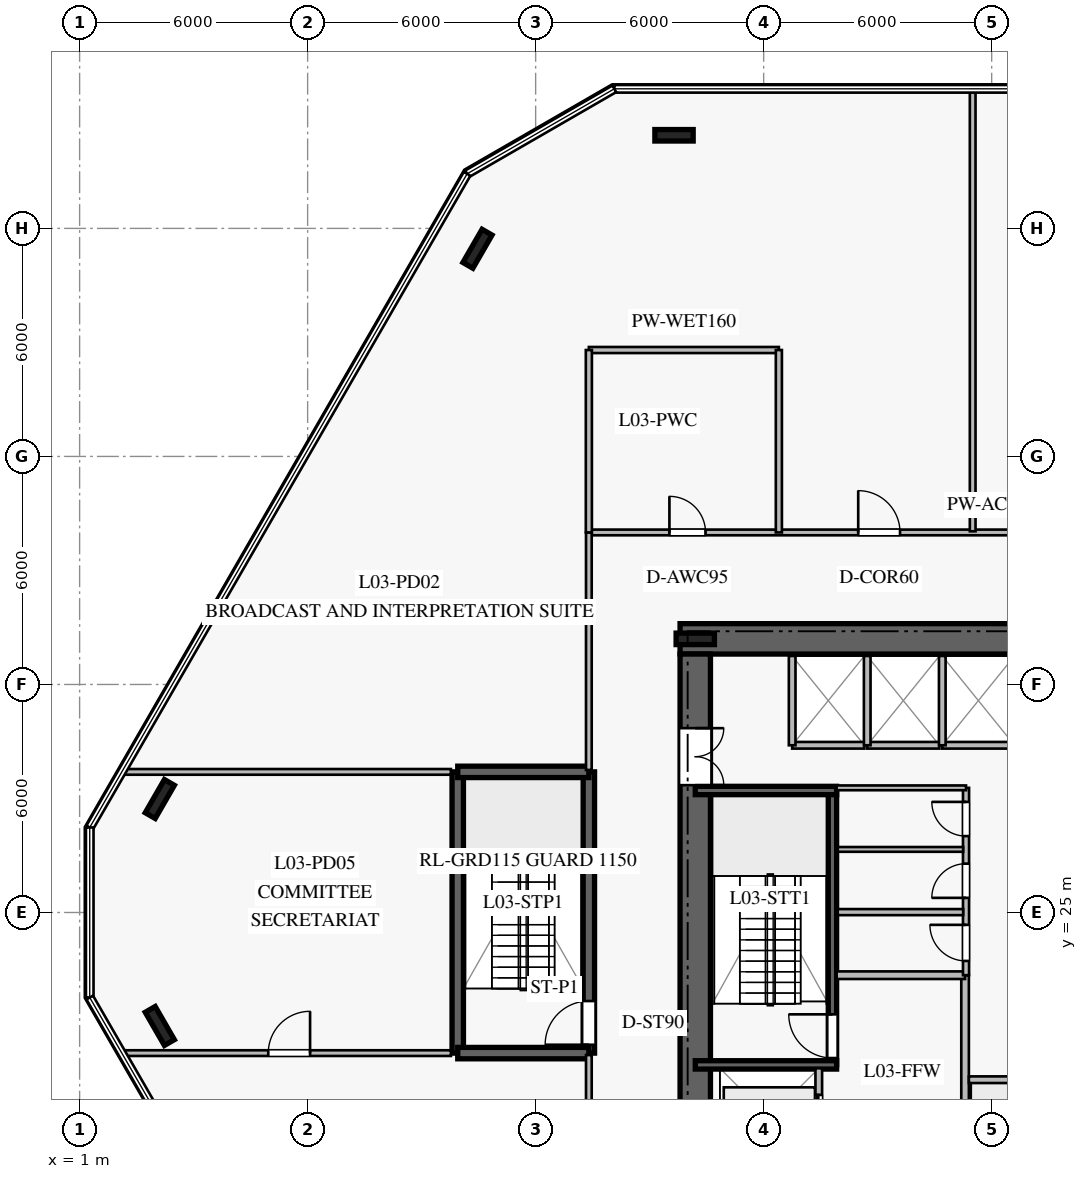
"""IFC4 building model, lengths in metres.
Left out: names, types, materials, properties, quantities, classifications, styles, units other than length and angle.
Written with IfcOpenShell. Run it as: python <this file> out.ifc"""

import sys

from ifc_helpers import new_model, si_unit, direction, frame, frame_2d, origin, origin_2d, place, context, subcontext, project, spatial, rectangle, i_section, extrude, element, fill, save


model = new_model("IFC4")
c1 = context("Model", 3, precision=1e-05, world=origin(), true_north=direction((0.0, 1.0)))
c2 = subcontext(c1, "Body", "Model", "MODEL_VIEW")
j1 = project(units=[si_unit("LENGTHUNIT", "METRE"), si_unit("PLANEANGLEUNIT", "RADIAN")], contexts=[c1])
p1 = place(None, origin())
s1 = spatial("IfcSite", under=j1, at=p1, CompositionType="ELEMENT")
p2 = place(p1, origin())
s2 = spatial("IfcBuilding", under=s1, at=p2, CompositionType="ELEMENT")
p3 = place(p2, frame((0.0, 0.0, 14.4)))
s3 = spatial("IfcBuildingStorey", under=s2, at=p3, CompositionType="ELEMENT", Elevation=14.4)
p4 = place(p3, frame((33.2, 32.2, 0.0), z_axis=(0.0, 0.0, 1.0), x_axis=(-1.0, 0.0, 0.0)))
e1 = element("IfcWall", 1, at=p4, inside=s3, PredefinedType="SHEAR", context=c2, shape_type="SweptSolid", body=[
    extrude(rectangle(XDim=16.4, YDim=0.8, at=frame_2d((8.2, 0.0))), origin(), (0.0, 0.0, 1.0), 4.3),
])
p5 = place(p4, frame((5.15, 0.0, 0.0)))
e2 = element("IfcOpeningElement", 2, at=p5, cuts=e1, PredefinedType="OPENING", context=c2, shape_type="SweptSolid", body=[
    extrude(rectangle(XDim=1.2, YDim=2.25, at=frame_2d((0.6, 1.125))), frame((0.0, 0.41, 0.0), z_axis=(0.0, -1.0, 0.0), x_axis=(1.0, 0.0, 0.0)), (0.0, 0.0, 1.0), 0.82),
])
p6 = place(p3, frame((17.2, 31.8, 0.0), z_axis=(0.0, 0.0, 1.0), x_axis=(0.0, -1.0, 0.0)))
e3 = element("IfcWall", 3, at=p6, inside=s3, PredefinedType="SHEAR", context=c2, shape_type="SweptSolid", body=[
    extrude(rectangle(XDim=13.6, YDim=0.8, at=frame_2d((6.8, 0.0))), origin(), (0.0, 0.0, 1.0), 4.3),
])
p7 = place(p6, frame((1.95, 0.0, 0.0)))
e4 = element("IfcOpeningElement", 4, at=p7, cuts=e3, PredefinedType="OPENING", context=c2, shape_type="SweptSolid", body=[
    extrude(rectangle(XDim=1.5, YDim=2.2, at=frame_2d((0.75, 1.1))), frame((0.0, 0.41, 0.0), z_axis=(0.0, -1.0, 0.0), x_axis=(1.0, 0.0, 0.0)), (0.0, 0.0, 1.0), 0.82),
])
p8 = place(p3, frame((17.2, 32.2, 0.0), z_axis=(0.0, 0.0, 1.0), x_axis=(1.0, 0.0, 0.0)))
e5 = element("IfcColumn", 5, at=p8, inside=s3, PredefinedType="COLUMN", context=c2, shape_type="SweptSolid", body=[
    extrude(i_section(OverallWidth=0.302, OverallDepth=1.008, WebThickness=0.021, FlangeThickness=0.04, at=origin_2d()), origin(), (0.0, 0.0, 1.0), 4.6),
])
p9 = place(p3, frame((20.81, 20.99, 0.0), z_axis=(0.0, 0.0, 1.0), x_axis=(0.0, 1.0, 0.0)))
e6 = element("IfcWall", 6, at=p9, inside=s3, PredefinedType="SOLIDWALL", context=c2, shape_type="SweptSolid", body=[
    extrude(rectangle(XDim=7.22, YDim=0.22, at=frame_2d((3.61, 0.0))), origin(), (0.0, 0.0, 1.0), 4.3),
])
p10 = place(p9, frame((0.18, 0.0, 0.0)))
e7 = element("IfcOpeningElement", 7, at=p10, cuts=e6, PredefinedType="OPENING", context=c2, shape_type="SweptSolid", body=[
    extrude(rectangle(XDim=1.15, YDim=2.2, at=frame_2d((0.575, 1.1))), frame((0.0, 0.12, 0.0), z_axis=(0.0, -1.0, 0.0), x_axis=(1.0, 0.0, 0.0)), (0.0, 0.0, 1.0), 0.24),
])
for number, where, z_axis, x_axis in (
    (8, (17.2, 20.99, 0.0), (0.0, 0.0, 1.0), (1.0, 0.0, 0.0)),
    (9, (17.2, 28.21, 0.0), (0.0, 0.0, 1.0), (1.0, 0.0, 0.0)),
):
    element("IfcWall", number, at=place(p3, frame(where, z_axis=z_axis, x_axis=x_axis)), inside=s3, PredefinedType="SOLIDWALL", context=c2, shape_type="SweptSolid", body=[
        extrude(rectangle(XDim=3.72, YDim=0.22, at=frame_2d((1.86, 0.0))), origin(), (0.0, 0.0, 1.0), 4.3),
    ])
p11 = place(p3, frame((14.4, 21.3, 0.0), z_axis=(0.0, 0.0, 1.0), x_axis=(0.0, 1.0, 0.0)))
e10 = element("IfcWall", 10, at=p11, inside=s3, PredefinedType="SOLIDWALL", context=c2, shape_type="SweptSolid", body=[
    extrude(rectangle(XDim=7.4, YDim=0.3, at=frame_2d((3.7, 0.0))), origin(), (0.0, 0.0, 1.0), 4.3),
])
p12 = place(p11, frame((0.22, 0.0, 0.0)))
e11 = element("IfcOpeningElement", 11, at=p12, cuts=e10, PredefinedType="OPENING", context=c2, shape_type="SweptSolid", body=[
    extrude(rectangle(XDim=1.15, YDim=2.2, at=frame_2d((0.575, 1.1))), frame((0.0, 0.16, 0.0), z_axis=(0.0, -1.0, 0.0), x_axis=(1.0, 0.0, 0.0)), (0.0, 0.0, 1.0), 0.32),
])
p13 = place(p3, frame((10.95, 21.3, 0.0), z_axis=(0.0, 0.0, 1.0), x_axis=(0.0, 1.0, 0.0)))
e12 = element("IfcWall", 12, at=p13, inside=s3, PredefinedType="SOLIDWALL", context=c2, shape_type="SweptSolid", body=[
    extrude(rectangle(XDim=7.4, YDim=0.3, at=frame_2d((3.7, 0.0))), origin(), (0.0, 0.0, 1.0), 4.3),
])
for number, where, z_axis, x_axis in (
    (13, (10.95, 21.3, 0.0), (0.0, 0.0, 1.0), (1.0, 0.0, 0.0)),
    (14, (10.95, 28.7, 0.0), (0.0, 0.0, 1.0), (1.0, 0.0, 0.0)),
):
    element("IfcWall", number, at=place(p3, frame(where, z_axis=z_axis, x_axis=x_axis)), inside=s3, PredefinedType="SOLIDWALL", context=c2, shape_type="SweptSolid", body=[
        extrude(rectangle(XDim=3.45, YDim=0.3, at=frame_2d((1.725, 0.0))), origin(), (0.0, 0.0, 1.0), 4.3),
    ])
for number, where, z_axis, x_axis in (
    (15, (16.641, 45.45, 0.0), (0.0, 0.0, 1.0), (1.0, 0.0, 0.0)),
    (16, (11.469, 42.464, 0.0), (0.0, 0.0, 1.0), (0.5, 0.866, 0.0)),
    (17, (3.11, 27.986, 0.0), (0.0, 0.0, 1.0), (0.5, 0.866, 0.0)),
    (18, (3.11, 22.014, 0.0), (0.0, 0.0, 1.0), (-0.5, 0.866, 0.0)),
):
    element("IfcColumn", number, at=place(p3, frame(where, z_axis=z_axis, x_axis=x_axis)), inside=s3, PredefinedType="COLUMN", context=c2, shape_type="SweptSolid", body=[
        extrude(i_section(OverallWidth=0.302, OverallDepth=1.008, WebThickness=0.021, FlangeThickness=0.04, at=origin_2d()), origin(), (0.0, 0.0, 1.0), 4.6),
    ])
p14 = place(p3, frame((24.3, 18.2, 0.0), z_axis=(0.0, 0.0, 1.0), x_axis=(0.0, 1.0, 0.0)))
e19 = element("IfcWall", 19, at=p14, inside=s3, PredefinedType="PARTITIONING", context=c2, shape_type="SweptSolid", body=[
    extrude(rectangle(XDim=5.15, YDim=0.2, at=frame_2d((2.575, 0.0))), origin(), (0.0, 0.0, 1.0), 4.3),
])
p15 = place(p3, frame((20.92, 23.35, 0.0), z_axis=(0.0, 0.0, 1.0), x_axis=(1.0, 0.0, 0.0)))
e20 = element("IfcWall", 20, at=p15, inside=s3, PredefinedType="PARTITIONING", context=c2, shape_type="SweptSolid", body=[
    extrude(rectangle(XDim=3.38, YDim=0.2, at=frame_2d((1.69, 0.0))), origin(), (0.0, 0.0, 1.0), 4.3),
])
p16 = place(p3, frame((24.325, 23.35, 0.0), z_axis=(0.0, 0.0, 1.0), x_axis=(0.0, 1.0, 0.0)))
e21 = element("IfcWall", 21, at=p16, inside=s3, PredefinedType="PLUMBINGWALL", context=c2, shape_type="SweptSolid", body=[
    extrude(rectangle(XDim=4.93, YDim=0.16, at=frame_2d((2.465, 0.0))), origin(), (0.0, 0.0, 1.0), 4.3),
])
p17 = place(p16, frame((0.375, 0.0, 0.0)))
e22 = element("IfcOpeningElement", 22, at=p17, cuts=e21, PredefinedType="OPENING", context=c2, shape_type="SweptSolid", body=[
    extrude(rectangle(XDim=0.95, YDim=2.1, at=frame_2d((0.475, 1.05))), frame((0.0, 0.09, 0.0), z_axis=(0.0, -1.0, 0.0), x_axis=(1.0, 0.0, 0.0)), (0.0, 0.0, 1.0), 0.18),
])
p18 = place(p16, frame((2.035, 0.0, 0.0)))
e23 = element("IfcOpeningElement", 23, at=p18, cuts=e21, PredefinedType="OPENING", context=c2, shape_type="SweptSolid", body=[
    extrude(rectangle(XDim=0.9, YDim=2.1, at=frame_2d((0.45, 1.05))), frame((0.0, 0.09, 0.0), z_axis=(0.0, -1.0, 0.0), x_axis=(1.0, 0.0, 0.0)), (0.0, 0.0, 1.0), 0.18),
])
p19 = place(p16, frame((3.66, 0.0, 0.0)))
e24 = element("IfcOpeningElement", 24, at=p19, cuts=e21, PredefinedType="OPENING", context=c2, shape_type="SweptSolid", body=[
    extrude(rectangle(XDim=0.9, YDim=2.1, at=frame_2d((0.45, 1.05))), frame((0.0, 0.09, 0.0), z_axis=(0.0, -1.0, 0.0), x_axis=(1.0, 0.0, 0.0)), (0.0, 0.0, 1.0), 0.18),
])
p20 = place(p3, frame((20.92, 28.28, 0.0), z_axis=(0.0, 0.0, 1.0), x_axis=(1.0, 0.0, 0.0)))
e25 = element("IfcWall", 25, at=p20, inside=s3, PredefinedType="PARTITIONING", context=c2, shape_type="SweptSolid", body=[
    extrude(rectangle(XDim=3.405, YDim=0.125, at=frame_2d((1.703, 0.0))), origin(), (0.0, 0.0, 1.0), 4.3),
])
p21 = place(p3, frame((20.95, 25.01, 0.0), z_axis=(0.0, 0.0, 1.0), x_axis=(1.0, 0.0, 0.0)))
e26 = element("IfcWall", 26, at=p21, inside=s3, PredefinedType="PLUMBINGWALL", context=c2, shape_type="SweptSolid", body=[
    extrude(rectangle(XDim=3.3, YDim=0.16, at=frame_2d((1.65, 0.0))), origin(), (0.0, 0.0, 1.0), 4.3),
])
p22 = place(p3, frame((20.95, 26.66, 0.0), z_axis=(0.0, 0.0, 1.0), x_axis=(1.0, 0.0, 0.0)))
e27 = element("IfcWall", 27, at=p22, inside=s3, PredefinedType="PARTITIONING", context=c2, shape_type="SweptSolid", body=[
    extrude(rectangle(XDim=3.3, YDim=0.125, at=frame_2d((1.65, 0.0))), origin(), (0.0, 0.0, 1.0), 4.3),
])
p23 = place(p3, frame((24.4, 20.6, 0.0), z_axis=(0.0, 0.0, 1.0), x_axis=(1.0, 0.0, 0.0)))
e28 = element("IfcWall", 28, at=p23, inside=s3, PredefinedType="PARTITIONING", context=c2, shape_type="SweptSolid", body=[
    extrude(rectangle(XDim=1.9, YDim=0.175, at=frame_2d((0.95, 0.0))), origin(), (0.0, 0.0, 1.0), 4.3),
])
p24 = place(p3, frame((19.75, 29.4, 0.0), z_axis=(0.0, 0.0, 1.0), x_axis=(1.0, 0.0, 0.0)))
e29 = element("IfcWall", 29, at=p24, inside=s3, PredefinedType="PARTITIONING", context=c2, shape_type="SweptSolid", body=[
    extrude(rectangle(XDim=1.9, YDim=0.175, at=frame_2d((0.95, 0.0))), origin(), (0.0, 0.0, 1.0), 4.3),
])
p25 = place(p3, frame((19.75, 29.4, 0.0), z_axis=(0.0, 0.0, 1.0), x_axis=(0.0, 1.0, 0.0)))
e30 = element("IfcWall", 30, at=p25, inside=s3, PredefinedType="PARTITIONING", context=c2, shape_type="SweptSolid", body=[
    extrude(rectangle(XDim=2.35, YDim=0.175, at=frame_2d((1.175, 0.0))), origin(), (0.0, 0.0, 1.0), 4.3),
])
p26 = place(p3, frame((21.725, 29.4, 0.0), z_axis=(0.0, 0.0, 1.0), x_axis=(1.0, 0.0, 0.0)))
e31 = element("IfcWall", 31, at=p26, inside=s3, PredefinedType="PARTITIONING", context=c2, shape_type="SweptSolid", body=[
    extrude(rectangle(XDim=1.9, YDim=0.175, at=frame_2d((0.95, 0.0))), origin(), (0.0, 0.0, 1.0), 4.3),
])
p27 = place(p3, frame((21.725, 29.4, 0.0), z_axis=(0.0, 0.0, 1.0), x_axis=(0.0, 1.0, 0.0)))
e32 = element("IfcWall", 32, at=p27, inside=s3, PredefinedType="PARTITIONING", context=c2, shape_type="SweptSolid", body=[
    extrude(rectangle(XDim=2.35, YDim=0.175, at=frame_2d((1.175, 0.0))), origin(), (0.0, 0.0, 1.0), 4.3),
])
p28 = place(p3, frame((23.7, 29.4, 0.0), z_axis=(0.0, 0.0, 1.0), x_axis=(1.0, 0.0, 0.0)))
e33 = element("IfcWall", 33, at=p28, inside=s3, PredefinedType="PARTITIONING", context=c2, shape_type="SweptSolid", body=[
    extrude(rectangle(XDim=1.9, YDim=0.175, at=frame_2d((0.95, 0.0))), origin(), (0.0, 0.0, 1.0), 4.3),
])
p29 = place(p3, frame((23.7, 29.4, 0.0), z_axis=(0.0, 0.0, 1.0), x_axis=(0.0, 1.0, 0.0)))
e34 = element("IfcWall", 34, at=p29, inside=s3, PredefinedType="PARTITIONING", context=c2, shape_type="SweptSolid", body=[
    extrude(rectangle(XDim=2.35, YDim=0.175, at=frame_2d((1.175, 0.0))), origin(), (0.0, 0.0, 1.0), 4.3),
])
p30 = place(p3, frame((20.45, 18.3, 0.0), z_axis=(0.0, 0.0, 1.0), x_axis=(0.0, 1.0, 0.0)))
e35 = element("IfcWall", 35, at=p30, inside=s3, PredefinedType="PARTITIONING", context=c2, shape_type="SweptSolid", body=[
    extrude(rectangle(XDim=2.6, YDim=0.175, at=frame_2d((1.3, 0.0))), origin(), (0.0, 0.0, 1.0), 4.3),
])
p31 = place(p30, frame((0.7, 0.0, 0.0)))
e36 = element("IfcOpeningElement", 36, at=p31, cuts=e35, PredefinedType="OPENING", context=c2, shape_type="SweptSolid", body=[
    extrude(rectangle(XDim=1.2, YDim=2.2, at=frame_2d((0.6, 1.1))), frame((0.0, 0.098, 0.0), z_axis=(0.0, -1.0, 0.0), x_axis=(1.0, 0.0, 0.0)), (0.0, 0.0, 1.0), 0.195),
])
p32 = place(p3, frame((14.4, 35.0, 0.0), z_axis=(0.0, 0.0, 1.0), x_axis=(1.0, 0.0, 0.0)))
e37 = element("IfcWall", 37, at=p32, inside=s3, PredefinedType="PARTITIONING", context=c2, shape_type="SweptSolid", body=[
    extrude(rectangle(XDim=21.2, YDim=0.15, at=frame_2d((10.6, 0.0))), origin(), (0.0, 0.0, 1.0), 3.75),
])
p33 = place(p32, frame((2.12, 0.0, 0.0)))
e38 = element("IfcOpeningElement", 38, at=p33, cuts=e37, PredefinedType="OPENING", context=c2, shape_type="SweptSolid", body=[
    extrude(rectangle(XDim=0.95, YDim=2.1, at=frame_2d((0.475, 1.05))), frame((0.0, 0.085, 0.0), z_axis=(0.0, -1.0, 0.0), x_axis=(1.0, 0.0, 0.0)), (0.0, 0.0, 1.0), 0.17),
])
p34 = place(p32, frame((7.088, 0.0, 0.0)))
e39 = element("IfcOpeningElement", 39, at=p34, cuts=e37, PredefinedType="OPENING", context=c2, shape_type="SweptSolid", body=[
    extrude(rectangle(XDim=1.1, YDim=2.2, at=frame_2d((0.55, 1.1))), frame((0.0, 0.085, 0.0), z_axis=(0.0, -1.0, 0.0), x_axis=(1.0, 0.0, 0.0)), (0.0, 0.0, 1.0), 0.17),
])
p35 = place(p32, frame((18.004, 0.0, 0.0)))
e40 = element("IfcOpeningElement", 40, at=p35, cuts=e37, PredefinedType="OPENING", context=c2, shape_type="SweptSolid", body=[
    extrude(rectangle(XDim=1.1, YDim=2.2, at=frame_2d((0.55, 1.1))), frame((0.0, 0.085, 0.0), z_axis=(0.0, -1.0, 0.0), x_axis=(1.0, 0.0, 0.0)), (0.0, 0.0, 1.0), 0.17),
])
p36 = place(p32, frame((12.55, 0.0, 0.0)))
e41 = element("IfcOpeningElement", 41, at=p36, cuts=e37, PredefinedType="OPENING", context=c2, shape_type="SweptSolid", body=[
    extrude(rectangle(XDim=1.1, YDim=2.2, at=frame_2d((0.55, 1.1))), frame((0.0, 0.085, 0.0), z_axis=(0.0, -1.0, 0.0), x_axis=(1.0, 0.0, 0.0)), (0.0, 0.0, 1.0), 0.17),
])
p37 = place(p3, frame((14.4, 15.0, 0.0), z_axis=(0.0, 0.0, 1.0), x_axis=(0.0, 1.0, 0.0)))
e42 = element("IfcWall", 42, at=p37, inside=s3, PredefinedType="PARTITIONING", context=c2, shape_type="SweptSolid", body=[
    extrude(rectangle(XDim=6.25, YDim=0.15, at=frame_2d((3.125, 0.0))), origin(), (0.0, 0.0, 1.0), 3.75),
])
p38 = place(p3, frame((14.4, 28.75, 0.0), z_axis=(0.0, 0.0, 1.0), x_axis=(0.0, 1.0, 0.0)))
e43 = element("IfcWall", 43, at=p38, inside=s3, PredefinedType="PARTITIONING", context=c2, shape_type="SweptSolid", body=[
    extrude(rectangle(XDim=6.25, YDim=0.15, at=frame_2d((3.125, 0.0))), origin(), (0.0, 0.0, 1.0), 4.3),
])
p39 = place(p3, frame((14.4, 39.8, 0.0), z_axis=(0.0, 0.0, 1.0), x_axis=(1.0, 0.0, 0.0)))
e44 = element("IfcWall", 44, at=p39, inside=s3, PredefinedType="PLUMBINGWALL", context=c2, shape_type="SweptSolid", body=[
    extrude(rectangle(XDim=5.0, YDim=0.16, at=frame_2d((2.5, 0.0))), origin(), (0.0, 0.0, 1.0), 3.75),
])
p40 = place(p3, frame((19.4, 35.0, 0.0), z_axis=(0.0, 0.0, 1.0), x_axis=(0.0, 1.0, 0.0)))
e45 = element("IfcWall", 45, at=p40, inside=s3, PredefinedType="PLUMBINGWALL", context=c2, shape_type="SweptSolid", body=[
    extrude(rectangle(XDim=4.8, YDim=0.16, at=frame_2d((2.4, 0.0))), origin(), (0.0, 0.0, 1.0), 4.3),
])
p41 = place(p3, frame((14.4, 35.0, 0.0), z_axis=(0.0, 0.0, 1.0), x_axis=(0.0, 1.0, 0.0)))
e46 = element("IfcWall", 46, at=p41, inside=s3, PredefinedType="PLUMBINGWALL", context=c2, shape_type="SweptSolid", body=[
    extrude(rectangle(XDim=4.8, YDim=0.16, at=frame_2d((2.4, 0.0))), origin(), (0.0, 0.0, 1.0), 3.75),
])
p42 = place(p3, frame((2.08, 21.3, 0.0), z_axis=(0.0, 0.0, 1.0), x_axis=(1.0, 0.0, 0.0)))
e47 = element("IfcWall", 47, at=p42, inside=s3, PredefinedType="PARTITIONING", context=c2, shape_type="SweptSolid", body=[
    extrude(rectangle(XDim=8.69, YDim=0.15, at=frame_2d((4.345, 0.0))), origin(), (0.0, 0.0, 1.0), 3.6),
])
p43 = place(p42, frame((3.884, 0.0, 0.0)))
e48 = element("IfcOpeningElement", 48, at=p43, cuts=e47, PredefinedType="OPENING", context=c2, shape_type="SweptSolid", body=[
    extrude(rectangle(XDim=1.1, YDim=2.2, at=frame_2d((0.55, 1.1))), frame((0.0, 0.085, 0.0), z_axis=(0.0, -1.0, 0.0), x_axis=(1.0, 0.0, 0.0)), (0.0, 0.0, 1.0), 0.17),
])
p44 = place(p3, frame((2.08, 28.7, 0.0), z_axis=(0.0, 0.0, 1.0), x_axis=(1.0, 0.0, 0.0)))
e49 = element("IfcWall", 49, at=p44, inside=s3, PredefinedType="PARTITIONING", context=c2, shape_type="SweptSolid", body=[
    extrude(rectangle(XDim=8.69, YDim=0.15, at=frame_2d((4.345, 0.0))), origin(), (0.0, 0.0, 1.0), 3.6),
])
p45 = place(p3, frame((24.5, 35.03, 0.0), z_axis=(0.0, 0.0, 1.0), x_axis=(0.0, 1.0, 0.0)))
e50 = element("IfcWall", 50, at=p45, inside=s3, PredefinedType="PARTITIONING", context=c2, shape_type="SweptSolid", body=[
    extrude(rectangle(XDim=11.67, YDim=0.15, at=frame_2d((5.835, 0.0))), origin(), (0.0, 0.0, 1.0), 3.6),
])
p46 = place(p10, origin())
e51 = element("IfcDoor", 51, at=p46, inside=s3, OperationType="SINGLE_SWING_RIGHT", PredefinedType="DOOR", context=c2, shape_type="SweptSolid", body=[
    extrude(rectangle(XDim=1.15, YDim=2.2, at=frame_2d((0.575, 1.1))), frame((0.0, 0.025, 0.0), z_axis=(0.0, -1.0, 0.0), x_axis=(1.0, 0.0, 0.0)), (0.0, 0.0, 1.0), 0.05),
])
fill(e7, e51)
p47 = place(p7, origin())
e52 = element("IfcDoor", 52, at=p47, inside=s3, OperationType="DOUBLE_DOOR_SINGLE_SWING", PredefinedType="DOOR", context=c2, shape_type="SweptSolid", body=[
    extrude(rectangle(XDim=1.5, YDim=2.2, at=frame_2d((0.75, 1.1))), frame((0.0, 0.025, 0.0), z_axis=(0.0, -1.0, 0.0), x_axis=(1.0, 0.0, 0.0)), (0.0, 0.0, 1.0), 0.05),
])
fill(e4, e52)
p48 = place(p17, origin())
e53 = element("IfcDoor", 53, at=p48, inside=s3, OperationType="SINGLE_SWING_RIGHT", PredefinedType="DOOR", context=c2, shape_type="SweptSolid", body=[
    extrude(rectangle(XDim=0.95, YDim=2.1, at=frame_2d((0.475, 1.05))), frame((0.0, 0.025, 0.0), z_axis=(0.0, -1.0, 0.0), x_axis=(1.0, 0.0, 0.0)), (0.0, 0.0, 1.0), 0.05),
])
fill(e22, e53)
p49 = place(p18, origin())
e54 = element("IfcDoor", 54, at=p49, inside=s3, OperationType="SINGLE_SWING_LEFT", PredefinedType="DOOR", context=c2, shape_type="SweptSolid", body=[
    extrude(rectangle(XDim=0.9, YDim=2.1, at=frame_2d((0.45, 1.05))), frame((0.0, 0.025, 0.0), z_axis=(0.0, -1.0, 0.0), x_axis=(1.0, 0.0, 0.0)), (0.0, 0.0, 1.0), 0.05),
])
fill(e23, e54)
p50 = place(p19, origin())
e55 = element("IfcDoor", 55, at=p50, inside=s3, OperationType="SINGLE_SWING_RIGHT", PredefinedType="DOOR", context=c2, shape_type="SweptSolid", body=[
    extrude(rectangle(XDim=0.9, YDim=2.1, at=frame_2d((0.45, 1.05))), frame((0.0, 0.025, 0.0), z_axis=(0.0, -1.0, 0.0), x_axis=(1.0, 0.0, 0.0)), (0.0, 0.0, 1.0), 0.05),
])
fill(e24, e55)
p51 = place(p31, origin())
e56 = element("IfcDoor", 56, at=p51, inside=s3, OperationType="DOUBLE_DOOR_SLIDING", PredefinedType="DOOR", context=c2, shape_type="SweptSolid", body=[
    extrude(rectangle(XDim=1.2, YDim=2.2, at=frame_2d((0.6, 1.1))), frame((0.0, 0.025, 0.0), z_axis=(0.0, -1.0, 0.0), x_axis=(1.0, 0.0, 0.0)), (0.0, 0.0, 1.0), 0.05),
])
fill(e36, e56)
p52 = place(p12, origin())
e57 = element("IfcDoor", 57, at=p52, inside=s3, OperationType="SINGLE_SWING_LEFT", PredefinedType="DOOR", context=c2, shape_type="SweptSolid", body=[
    extrude(rectangle(XDim=1.15, YDim=2.2, at=frame_2d((0.575, 1.1))), frame((0.0, 0.025, 0.0), z_axis=(0.0, -1.0, 0.0), x_axis=(1.0, 0.0, 0.0)), (0.0, 0.0, 1.0), 0.05),
])
fill(e11, e57)
p53 = place(p33, origin())
e58 = element("IfcDoor", 58, at=p53, inside=s3, OperationType="SINGLE_SWING_LEFT", PredefinedType="DOOR", context=c2, shape_type="SweptSolid", body=[
    extrude(rectangle(XDim=0.95, YDim=2.1, at=frame_2d((0.475, 1.05))), frame((0.0, 0.025, 0.0), z_axis=(0.0, -1.0, 0.0), x_axis=(1.0, 0.0, 0.0)), (0.0, 0.0, 1.0), 0.05),
])
fill(e38, e58)
p54 = place(p34, origin())
e59 = element("IfcDoor", 59, at=p54, inside=s3, OperationType="SINGLE_SWING_LEFT", PredefinedType="DOOR", context=c2, shape_type="SweptSolid", body=[
    extrude(rectangle(XDim=1.1, YDim=2.2, at=frame_2d((0.55, 1.1))), frame((0.0, 0.025, 0.0), z_axis=(0.0, -1.0, 0.0), x_axis=(1.0, 0.0, 0.0)), (0.0, 0.0, 1.0), 0.05),
])
fill(e39, e59)
p55 = place(p43, origin())
e60 = element("IfcDoor", 60, at=p55, inside=s3, OperationType="SINGLE_SWING_RIGHT", PredefinedType="DOOR", context=c2, shape_type="SweptSolid", body=[
    extrude(rectangle(XDim=1.1, YDim=2.2, at=frame_2d((0.55, 1.1))), frame((0.0, 0.025, 0.0), z_axis=(0.0, -1.0, 0.0), x_axis=(1.0, 0.0, 0.0)), (0.0, 0.0, 1.0), 0.05),
])
fill(e48, e60)
save(model, sys.argv[1])
